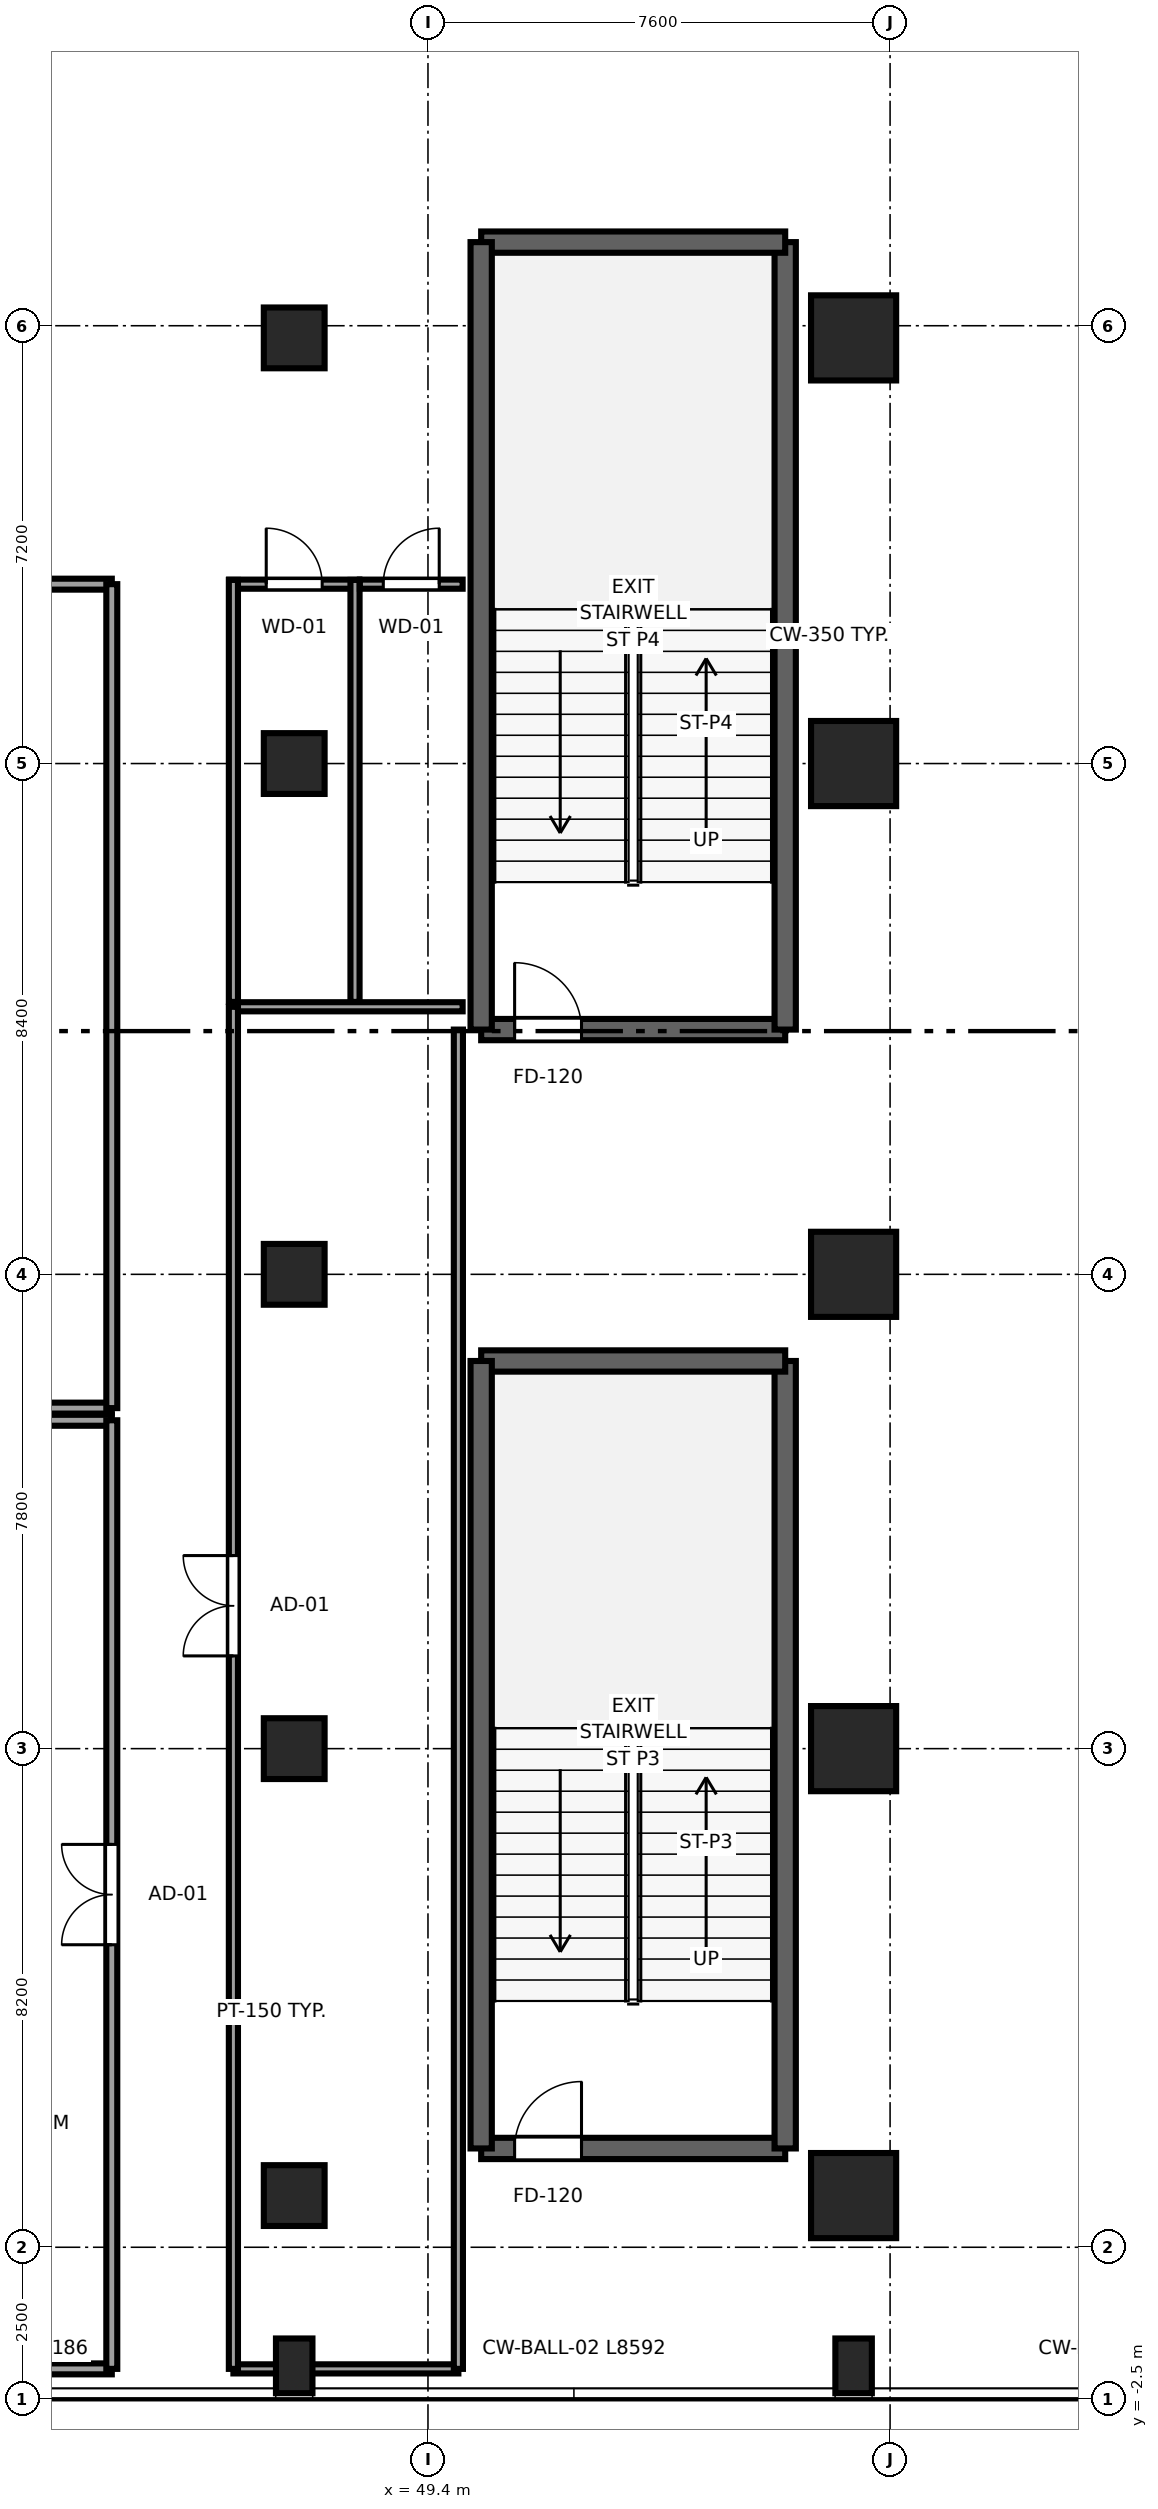
"""IFC4 building model, lengths in metres.
Left out: names, types, materials, properties, quantities, classifications, styles, units other than length and angle.
Written with IfcOpenShell. Run it as: python <this file> out.ifc"""

import sys

from ifc_helpers import new_model, si_unit, direction, frame, frame_2d, origin, origin_2d, place, context, subcontext, project, spatial, rectangle, extrude, source, transform, mapped, element, fill, save


model = new_model("IFC4")
c1 = context("Model", 3, precision=1e-05, world=origin(), true_north=direction((0.0, 1.0)))
c2 = subcontext(c1, "Body", "Model", "MODEL_VIEW")
j1 = project(units=[si_unit("LENGTHUNIT", "METRE"), si_unit("PLANEANGLEUNIT", "RADIAN")], contexts=[c1])
p1 = place(None, origin())
s1 = spatial("IfcSite", under=j1, at=p1, CompositionType="ELEMENT")
p2 = place(p1, origin())
s2 = spatial("IfcBuilding", under=s1, at=p2, CompositionType="ELEMENT")
p3 = place(p2, frame((0.0, 0.0, 11.0)))
s3 = spatial("IfcBuildingStorey", under=s2, at=p3, CompositionType="ELEMENT", Elevation=11.0)
p4 = place(p3, frame((50.275, 1.625, 0.0), z_axis=(0.0, 0.0, 1.0), x_axis=(1.0, 0.0, 0.0)))
e1 = element("IfcWall", 1, at=p4, inside=s3, PredefinedType="SHEAR", context=c2, shape_type="SweptSolid", body=[
    extrude(rectangle(XDim=5.0, YDim=0.35, at=frame_2d((2.5, 0.0))), origin(), (0.0, 0.0, 1.0), 5.0),
])
p5 = place(p4, frame((0.55, 0.0, 0.0)))
e2 = element("IfcOpeningElement", 2, at=p5, cuts=e1, PredefinedType="OPENING", context=c2, shape_type="SweptSolid", body=[
    extrude(rectangle(XDim=1.1, YDim=2.12, at=frame_2d((0.55, 1.06))), frame((0.0, 0.185, 0.0), z_axis=(0.0, -1.0, 0.0), x_axis=(1.0, 0.0, 0.0)), (0.0, 0.0, 1.0), 0.37),
])
p6 = place(p3, frame((55.275, 1.625, 0.0), z_axis=(0.0, 0.0, 1.0), x_axis=(0.0, 1.0, 0.0)))
e3 = element("IfcWall", 3, at=p6, inside=s3, PredefinedType="SHEAR", context=c2, shape_type="SweptSolid", body=[
    extrude(rectangle(XDim=12.95, YDim=0.35, at=frame_2d((6.475, 0.0))), origin(), (0.0, 0.0, 1.0), 5.0),
])
p7 = place(p3, frame((55.275, 14.575, 0.0), z_axis=(0.0, 0.0, 1.0), x_axis=(-1.0, 0.0, 0.0)))
e4 = element("IfcWall", 4, at=p7, inside=s3, PredefinedType="SHEAR", context=c2, shape_type="SweptSolid", body=[
    extrude(rectangle(XDim=5.0, YDim=0.35, at=frame_2d((2.5, 0.0))), origin(), (0.0, 0.0, 1.0), 5.0),
])
p8 = place(p3, frame((50.275, 14.575, 0.0), z_axis=(0.0, 0.0, 1.0), x_axis=(0.0, -1.0, 0.0)))
e5 = element("IfcWall", 5, at=p8, inside=s3, PredefinedType="SHEAR", context=c2, shape_type="SweptSolid", body=[
    extrude(rectangle(XDim=12.95, YDim=0.35, at=frame_2d((6.475, 0.0))), origin(), (0.0, 0.0, 1.0), 5.0),
])
p9 = place(p3, frame((50.275, 20.025, 0.0), z_axis=(0.0, 0.0, 1.0), x_axis=(1.0, 0.0, 0.0)))
e6 = element("IfcWall", 6, at=p9, inside=s3, PredefinedType="SHEAR", context=c2, shape_type="SweptSolid", body=[
    extrude(rectangle(XDim=5.0, YDim=0.35, at=frame_2d((2.5, 0.0))), origin(), (0.0, 0.0, 1.0), 5.0),
])
p10 = place(p9, frame((0.55, 0.0, 0.0)))
e7 = element("IfcOpeningElement", 7, at=p10, cuts=e6, PredefinedType="OPENING", context=c2, shape_type="SweptSolid", body=[
    extrude(rectangle(XDim=1.1, YDim=2.12, at=frame_2d((0.55, 1.06))), frame((0.0, 0.185, 0.0), z_axis=(0.0, -1.0, 0.0), x_axis=(1.0, 0.0, 0.0)), (0.0, 0.0, 1.0), 0.37),
])
p11 = place(p3, frame((55.275, 20.025, 0.0), z_axis=(0.0, 0.0, 1.0), x_axis=(0.0, 1.0, 0.0)))
e8 = element("IfcWall", 8, at=p11, inside=s3, PredefinedType="SHEAR", context=c2, shape_type="SweptSolid", body=[
    extrude(rectangle(XDim=12.95, YDim=0.35, at=frame_2d((6.475, 0.0))), origin(), (0.0, 0.0, 1.0), 5.0),
])
p12 = place(p3, frame((55.275, 32.975, 0.0), z_axis=(0.0, 0.0, 1.0), x_axis=(-1.0, 0.0, 0.0)))
e9 = element("IfcWall", 9, at=p12, inside=s3, PredefinedType="SHEAR", context=c2, shape_type="SweptSolid", body=[
    extrude(rectangle(XDim=5.0, YDim=0.35, at=frame_2d((2.5, 0.0))), origin(), (0.0, 0.0, 1.0), 5.0),
])
p13 = place(p3, frame((50.275, 32.975, 0.0), z_axis=(0.0, 0.0, 1.0), x_axis=(0.0, -1.0, 0.0)))
e10 = element("IfcWall", 10, at=p13, inside=s3, PredefinedType="SHEAR", context=c2, shape_type="SweptSolid", body=[
    extrude(rectangle(XDim=12.95, YDim=0.35, at=frame_2d((6.475, 0.0))), origin(), (0.0, 0.0, 1.0), 5.0),
])
m1 = source(origin(), c2, "Body", "SweptSolid", [
    extrude(rectangle(XDim=1.0, YDim=1.0, at=origin_2d()), origin(), (0.0, 0.0, 1.0), 5.0),
])
p14 = place(p3, frame((47.2, 0.85, 0.0), z_axis=(0.0, 0.0, 1.0), x_axis=(1.0, 0.0, 0.0)))
e11 = element("IfcColumn", 11, at=p14, inside=s3, PredefinedType="COLUMN", context=c2, shape_type="MappedRepresentation", body=[
    mapped(m1, transform((0.0, 0.0, 0.0), x_axis=(1.0, 0.0, 0.0), y_axis=(0.0, 1.0, 0.0), z_axis=(0.0, 0.0, 1.0), scale=1.0)),
])
m2 = source(origin(), c2, "Body", "SweptSolid", [
    extrude(rectangle(XDim=1.4, YDim=1.4, at=origin_2d()), origin(), (0.0, 0.0, 1.0), 5.0),
])
p15 = place(p3, frame((56.4, 0.85, 0.0), z_axis=(0.0, 0.0, 1.0), x_axis=(1.0, 0.0, 0.0)))
e12 = element("IfcColumn", 12, at=p15, inside=s3, PredefinedType="COLUMN", context=c2, shape_type="MappedRepresentation", body=[
    mapped(m2, transform((0.0, 0.0, 0.0), x_axis=(1.0, 0.0, 0.0), y_axis=(0.0, 1.0, 0.0), z_axis=(0.0, 0.0, 1.0), scale=1.0)),
])
p16 = place(p3, frame((47.2, 8.2, 0.0), z_axis=(0.0, 0.0, 1.0), x_axis=(1.0, 0.0, 0.0)))
e13 = element("IfcColumn", 13, at=p16, inside=s3, PredefinedType="COLUMN", context=c2, shape_type="MappedRepresentation", body=[
    mapped(m1, transform((0.0, 0.0, 0.0), x_axis=(1.0, 0.0, 0.0), y_axis=(0.0, 1.0, 0.0), z_axis=(0.0, 0.0, 1.0), scale=1.0)),
])
p17 = place(p3, frame((56.4, 8.2, 0.0), z_axis=(0.0, 0.0, 1.0), x_axis=(1.0, 0.0, 0.0)))
e14 = element("IfcColumn", 14, at=p17, inside=s3, PredefinedType="COLUMN", context=c2, shape_type="MappedRepresentation", body=[
    mapped(m2, transform((0.0, 0.0, 0.0), x_axis=(1.0, 0.0, 0.0), y_axis=(0.0, 1.0, 0.0), z_axis=(0.0, 0.0, 1.0), scale=1.0)),
])
p18 = place(p3, frame((47.2, 16.0, 0.0), z_axis=(0.0, 0.0, 1.0), x_axis=(1.0, 0.0, 0.0)))
e15 = element("IfcColumn", 15, at=p18, inside=s3, PredefinedType="COLUMN", context=c2, shape_type="MappedRepresentation", body=[
    mapped(m1, transform((0.0, 0.0, 0.0), x_axis=(1.0, 0.0, 0.0), y_axis=(0.0, 1.0, 0.0), z_axis=(0.0, 0.0, 1.0), scale=1.0)),
])
p19 = place(p3, frame((56.4, 16.0, 0.0), z_axis=(0.0, 0.0, 1.0), x_axis=(1.0, 0.0, 0.0)))
e16 = element("IfcColumn", 16, at=p19, inside=s3, PredefinedType="COLUMN", context=c2, shape_type="MappedRepresentation", body=[
    mapped(m2, transform((0.0, 0.0, 0.0), x_axis=(1.0, 0.0, 0.0), y_axis=(0.0, 1.0, 0.0), z_axis=(0.0, 0.0, 1.0), scale=1.0)),
])
p20 = place(p3, frame((47.2, 24.4, 0.0), z_axis=(0.0, 0.0, 1.0), x_axis=(1.0, 0.0, 0.0)))
e17 = element("IfcColumn", 17, at=p20, inside=s3, PredefinedType="COLUMN", context=c2, shape_type="MappedRepresentation", body=[
    mapped(m1, transform((0.0, 0.0, 0.0), x_axis=(1.0, 0.0, 0.0), y_axis=(0.0, 1.0, 0.0), z_axis=(0.0, 0.0, 1.0), scale=1.0)),
])
p21 = place(p3, frame((56.4, 24.4, 0.0), z_axis=(0.0, 0.0, 1.0), x_axis=(1.0, 0.0, 0.0)))
e18 = element("IfcColumn", 18, at=p21, inside=s3, PredefinedType="COLUMN", context=c2, shape_type="MappedRepresentation", body=[
    mapped(m2, transform((0.0, 0.0, 0.0), x_axis=(1.0, 0.0, 0.0), y_axis=(0.0, 1.0, 0.0), z_axis=(0.0, 0.0, 1.0), scale=1.0)),
])
p22 = place(p3, frame((47.2, 31.4, 0.0), z_axis=(0.0, 0.0, 1.0), x_axis=(1.0, 0.0, 0.0)))
e19 = element("IfcColumn", 19, at=p22, inside=s3, PredefinedType="COLUMN", context=c2, shape_type="MappedRepresentation", body=[
    mapped(m1, transform((0.0, 0.0, 0.0), x_axis=(1.0, 0.0, 0.0), y_axis=(0.0, 1.0, 0.0), z_axis=(0.0, 0.0, 1.0), scale=1.0)),
])
p23 = place(p3, frame((56.4, 31.4, 0.0), z_axis=(0.0, 0.0, 1.0), x_axis=(1.0, 0.0, 0.0)))
e20 = element("IfcColumn", 20, at=p23, inside=s3, PredefinedType="COLUMN", context=c2, shape_type="MappedRepresentation", body=[
    mapped(m2, transform((0.0, 0.0, 0.0), x_axis=(1.0, 0.0, 0.0), y_axis=(0.0, 1.0, 0.0), z_axis=(0.0, 0.0, 1.0), scale=1.0)),
])
m3 = source(origin(), c2, "Body", "SweptSolid", [
    extrude(rectangle(XDim=0.6, YDim=0.9, at=origin_2d()), origin(), (0.0, 0.0, 1.0), 5.0),
])
for number, where, z_axis, x_axis in (
    (21, (47.2, -1.95, 0.0), (0.0, 0.0, 1.0), (1.0, 0.0, 0.0)),
    (22, (56.4, -1.95, 0.0), (0.0, 0.0, 1.0), (1.0, 0.0, 0.0)),
):
    element("IfcColumn", number, at=place(p3, frame(where, z_axis=z_axis, x_axis=x_axis)), inside=s3, PredefinedType="PILASTER", context=c2, shape_type="MappedRepresentation", body=[
        mapped(m3, transform((0.0, 0.0, 0.0), x_axis=(1.0, 0.0, 0.0), y_axis=(0.0, 1.0, 0.0), z_axis=(0.0, 0.0, 1.0), scale=1.0)),
    ])
p24 = place(p3, frame((38.85, -2.0, 0.0), z_axis=(0.0, 0.0, 1.0), x_axis=(1.0, 0.0, 0.0)))
e23 = element("IfcWall", 23, at=p24, inside=s3, PredefinedType="PARTITIONING", context=c2, shape_type="SweptSolid", body=[
    extrude(rectangle(XDim=5.35, YDim=0.18, at=frame_2d((2.675, 0.0))), origin(), (0.0, 0.0, 1.0), 4.03),
])
p25 = place(p3, frame((38.85, 13.6, 0.0), z_axis=(0.0, 0.0, 1.0), x_axis=(1.0, 0.0, 0.0)))
e24 = element("IfcWall", 24, at=p25, inside=s3, PredefinedType="PARTITIONING", context=c2, shape_type="SweptSolid", body=[
    extrude(rectangle(XDim=5.35, YDim=0.18, at=frame_2d((2.675, 0.0))), origin(), (0.0, 0.0, 1.0), 4.74),
])
p26 = place(p3, frame((44.2, -2.0, 0.0), z_axis=(0.0, 0.0, 1.0), x_axis=(0.0, 1.0, 0.0)))
e25 = element("IfcWall", 25, at=p26, inside=s3, PredefinedType="PARTITIONING", context=c2, shape_type="SweptSolid", body=[
    extrude(rectangle(XDim=15.6, YDim=0.18, at=frame_2d((7.8, 0.0))), origin(), (0.0, 0.0, 1.0), 4.276),
])
p27 = place(p26, frame((6.975, 0.0, 0.0)))
e26 = element("IfcOpeningElement", 26, at=p27, cuts=e25, PredefinedType="OPENING", context=c2, shape_type="SweptSolid", body=[
    extrude(rectangle(XDim=1.65, YDim=2.15, at=frame_2d((0.825, 1.075))), frame((0.0, 0.1, 0.0), z_axis=(0.0, -1.0, 0.0), x_axis=(1.0, 0.0, 0.0)), (0.0, 0.0, 1.0), 0.2),
])
p28 = place(p3, frame((38.85, 13.8, 0.0), z_axis=(0.0, 0.0, 1.0), x_axis=(1.0, 0.0, 0.0)))
e27 = element("IfcWall", 27, at=p28, inside=s3, PredefinedType="PARTITIONING", context=c2, shape_type="SweptSolid", body=[
    extrude(rectangle(XDim=5.35, YDim=0.18, at=frame_2d((2.675, 0.0))), origin(), (0.0, 0.0, 1.0), 4.74),
])
p29 = place(p3, frame((38.85, 27.35, 0.0), z_axis=(0.0, 0.0, 1.0), x_axis=(1.0, 0.0, 0.0)))
e28 = element("IfcWall", 28, at=p29, inside=s3, PredefinedType="PARTITIONING", context=c2, shape_type="SweptSolid", body=[
    extrude(rectangle(XDim=5.35, YDim=0.18, at=frame_2d((2.675, 0.0))), origin(), (0.0, 0.0, 1.0), 4.74),
])
p30 = place(p29, frame((1.85, 0.0, 0.0)))
e29 = element("IfcOpeningElement", 29, at=p30, cuts=e28, PredefinedType="OPENING", context=c2, shape_type="SweptSolid", body=[
    extrude(rectangle(XDim=1.65, YDim=2.15, at=frame_2d((0.825, 1.075))), frame((0.0, 0.1, 0.0), z_axis=(0.0, -1.0, 0.0), x_axis=(1.0, 0.0, 0.0)), (0.0, 0.0, 1.0), 0.2),
])
p31 = place(p3, frame((44.2, 13.8, 0.0), z_axis=(0.0, 0.0, 1.0), x_axis=(0.0, 1.0, 0.0)))
e30 = element("IfcWall", 30, at=p31, inside=s3, PredefinedType="PARTITIONING", context=c2, shape_type="SweptSolid", body=[
    extrude(rectangle(XDim=13.55, YDim=0.18, at=frame_2d((6.775, 0.0))), origin(), (0.0, 0.0, 1.0), 4.276),
])
p32 = place(p3, frame((46.2, -2.0, 0.0), z_axis=(0.0, 0.0, 1.0), x_axis=(1.0, 0.0, 0.0)))
e31 = element("IfcWall", 31, at=p32, inside=s3, PredefinedType="PARTITIONING", context=c2, shape_type="SweptSolid", body=[
    extrude(rectangle(XDim=3.7, YDim=0.15, at=frame_2d((1.85, 0.0))), origin(), (0.0, 0.0, 1.0), 4.03),
])
p33 = place(p3, frame((46.13, 20.4, 0.0), z_axis=(0.0, 0.0, 1.0), x_axis=(1.0, 0.0, 0.0)))
e32 = element("IfcWall", 32, at=p33, inside=s3, PredefinedType="PARTITIONING", context=c2, shape_type="SweptSolid", body=[
    extrude(rectangle(XDim=3.84, YDim=0.15, at=frame_2d((1.92, 0.0))), origin(), (0.0, 0.0, 1.0), 4.74),
])
p34 = place(p3, frame((46.2, -2.0, 0.0), z_axis=(0.0, 0.0, 1.0), x_axis=(0.0, 1.0, 0.0)))
e33 = element("IfcWall", 33, at=p34, inside=s3, PredefinedType="PARTITIONING", context=c2, shape_type="SweptSolid", body=[
    extrude(rectangle(XDim=22.4, YDim=0.15, at=frame_2d((11.2, 0.0))), origin(), (0.0, 0.0, 1.0), 4.74),
])
p35 = place(p34, frame((11.725, 0.0, 0.0)))
e34 = element("IfcOpeningElement", 34, at=p35, cuts=e33, PredefinedType="OPENING", context=c2, shape_type="SweptSolid", body=[
    extrude(rectangle(XDim=1.65, YDim=2.15, at=frame_2d((0.825, 1.075))), frame((0.0, 0.085, 0.0), z_axis=(0.0, -1.0, 0.0), x_axis=(1.0, 0.0, 0.0)), (0.0, 0.0, 1.0), 0.17),
])
p36 = place(p3, frame((49.9, -2.0, 0.0), z_axis=(0.0, 0.0, 1.0), x_axis=(0.0, 1.0, 0.0)))
e35 = element("IfcWall", 35, at=p36, inside=s3, PredefinedType="PARTITIONING", context=c2, shape_type="SweptSolid", body=[
    extrude(rectangle(XDim=22.025, YDim=0.15, at=frame_2d((11.012, 0.0))), origin(), (0.0, 0.0, 1.0), 4.74),
])
p37 = place(p3, frame((46.13, 27.35, 0.0), z_axis=(0.0, 0.0, 1.0), x_axis=(1.0, 0.0, 0.0)))
e36 = element("IfcWall", 36, at=p37, inside=s3, PredefinedType="PARTITIONING", context=c2, shape_type="SweptSolid", body=[
    extrude(rectangle(XDim=2.14, YDim=0.15, at=frame_2d((1.07, 0.0))), origin(), (0.0, 0.0, 1.0), 4.74),
])
p38 = place(p37, frame((0.61, 0.0, 0.0)))
e37 = element("IfcOpeningElement", 37, at=p38, cuts=e36, PredefinedType="OPENING", context=c2, shape_type="SweptSolid", body=[
    extrude(rectangle(XDim=0.92, YDim=2.01, at=frame_2d((0.46, 1.005))), frame((0.0, 0.085, 0.0), z_axis=(0.0, -1.0, 0.0), x_axis=(1.0, 0.0, 0.0)), (0.0, 0.0, 1.0), 0.17),
])
for number, where, z_axis, x_axis in (
    (38, (46.2, 20.48, 0.0), (0.0, 0.0, 1.0), (0.0, 1.0, 0.0)),
    (39, (48.2, 20.48, 0.0), (0.0, 0.0, 1.0), (0.0, 1.0, 0.0)),
):
    element("IfcWall", number, at=place(p3, frame(where, z_axis=z_axis, x_axis=x_axis)), inside=s3, PredefinedType="PARTITIONING", context=c2, shape_type="SweptSolid", body=[
        extrude(rectangle(XDim=6.94, YDim=0.15, at=frame_2d((3.47, 0.0))), origin(), (0.0, 0.0, 1.0), 4.74),
    ])
p39 = place(p3, frame((48.28, 27.35, 0.0), z_axis=(0.0, 0.0, 1.0), x_axis=(1.0, 0.0, 0.0)))
e40 = element("IfcWall", 40, at=p39, inside=s3, PredefinedType="PARTITIONING", context=c2, shape_type="SweptSolid", body=[
    extrude(rectangle(XDim=1.69, YDim=0.15, at=frame_2d((0.845, 0.0))), origin(), (0.0, 0.0, 1.0), 4.74),
])
p40 = place(p39, frame((0.385, 0.0, 0.0)))
e41 = element("IfcOpeningElement", 41, at=p40, cuts=e40, PredefinedType="OPENING", context=c2, shape_type="SweptSolid", body=[
    extrude(rectangle(XDim=0.92, YDim=2.01, at=frame_2d((0.46, 1.005))), frame((0.0, 0.085, 0.0), z_axis=(0.0, -1.0, 0.0), x_axis=(1.0, 0.0, 0.0)), (0.0, 0.0, 1.0), 0.17),
])
m4 = source(origin(), c2, "Body", "SweptSolid", [
    extrude(rectangle(XDim=1.1, YDim=2.12, at=frame_2d((0.55, 1.06))), frame((0.0, 0.025, 0.0), z_axis=(0.0, -1.0, 0.0), x_axis=(1.0, 0.0, 0.0)), (0.0, 0.0, 1.0), 0.05),
])
p41 = place(p5, origin())
e42 = element("IfcDoor", 42, at=p41, inside=s3, OperationType="SINGLE_SWING_RIGHT", PredefinedType="DOOR", context=c2, shape_type="MappedRepresentation", body=[
    mapped(m4, transform((0.0, 0.0, 0.0), x_axis=(1.0, 0.0, 0.0), y_axis=(0.0, 1.0, 0.0), z_axis=(0.0, 0.0, 1.0), scale=1.0)),
])
fill(e2, e42)
p42 = place(p10, origin())
e43 = element("IfcDoor", 43, at=p42, inside=s3, OperationType="SINGLE_SWING_LEFT", PredefinedType="DOOR", context=c2, shape_type="MappedRepresentation", body=[
    mapped(m4, transform((0.0, 0.0, 0.0), x_axis=(1.0, 0.0, 0.0), y_axis=(0.0, 1.0, 0.0), z_axis=(0.0, 0.0, 1.0), scale=1.0)),
])
fill(e7, e43)
m5 = source(origin(), c2, "Body", "SweptSolid", [
    extrude(rectangle(XDim=1.65, YDim=2.15, at=frame_2d((0.825, 1.075))), frame((0.0, 0.025, 0.0), z_axis=(0.0, -1.0, 0.0), x_axis=(1.0, 0.0, 0.0)), (0.0, 0.0, 1.0), 0.05),
])
p43 = place(p27, origin())
e44 = element("IfcDoor", 44, at=p43, inside=s3, OperationType="DOUBLE_DOOR_SINGLE_SWING", PredefinedType="DOOR", context=c2, shape_type="MappedRepresentation", body=[
    mapped(m5, transform((0.0, 0.0, 0.0), x_axis=(1.0, 0.0, 0.0), y_axis=(0.0, 1.0, 0.0), z_axis=(0.0, 0.0, 1.0), scale=1.0)),
])
fill(e26, e44)
p44 = place(p35, origin())
e45 = element("IfcDoor", 45, at=p44, inside=s3, OperationType="DOUBLE_DOOR_SINGLE_SWING", PredefinedType="DOOR", context=c2, shape_type="MappedRepresentation", body=[
    mapped(m5, transform((0.0, 0.0, 0.0), x_axis=(1.0, 0.0, 0.0), y_axis=(0.0, 1.0, 0.0), z_axis=(0.0, 0.0, 1.0), scale=1.0)),
])
fill(e34, e45)
m6 = source(origin(), c2, "Body", "SweptSolid", [
    extrude(rectangle(XDim=0.92, YDim=2.01, at=frame_2d((0.46, 1.005))), frame((0.0, 0.025, 0.0), z_axis=(0.0, -1.0, 0.0), x_axis=(1.0, 0.0, 0.0)), (0.0, 0.0, 1.0), 0.05),
])
p45 = place(p38, origin())
e46 = element("IfcDoor", 46, at=p45, inside=s3, OperationType="SINGLE_SWING_LEFT", PredefinedType="DOOR", context=c2, shape_type="MappedRepresentation", body=[
    mapped(m6, transform((0.0, 0.0, 0.0), x_axis=(1.0, 0.0, 0.0), y_axis=(0.0, 1.0, 0.0), z_axis=(0.0, 0.0, 1.0), scale=1.0)),
])
fill(e37, e46)
p46 = place(p40, origin())
e47 = element("IfcDoor", 47, at=p46, inside=s3, OperationType="SINGLE_SWING_RIGHT", PredefinedType="DOOR", context=c2, shape_type="MappedRepresentation", body=[
    mapped(m6, transform((0.0, 0.0, 0.0), x_axis=(1.0, 0.0, 0.0), y_axis=(0.0, 1.0, 0.0), z_axis=(0.0, 0.0, 1.0), scale=1.0)),
])
fill(e41, e47)
save(model, sys.argv[1])
